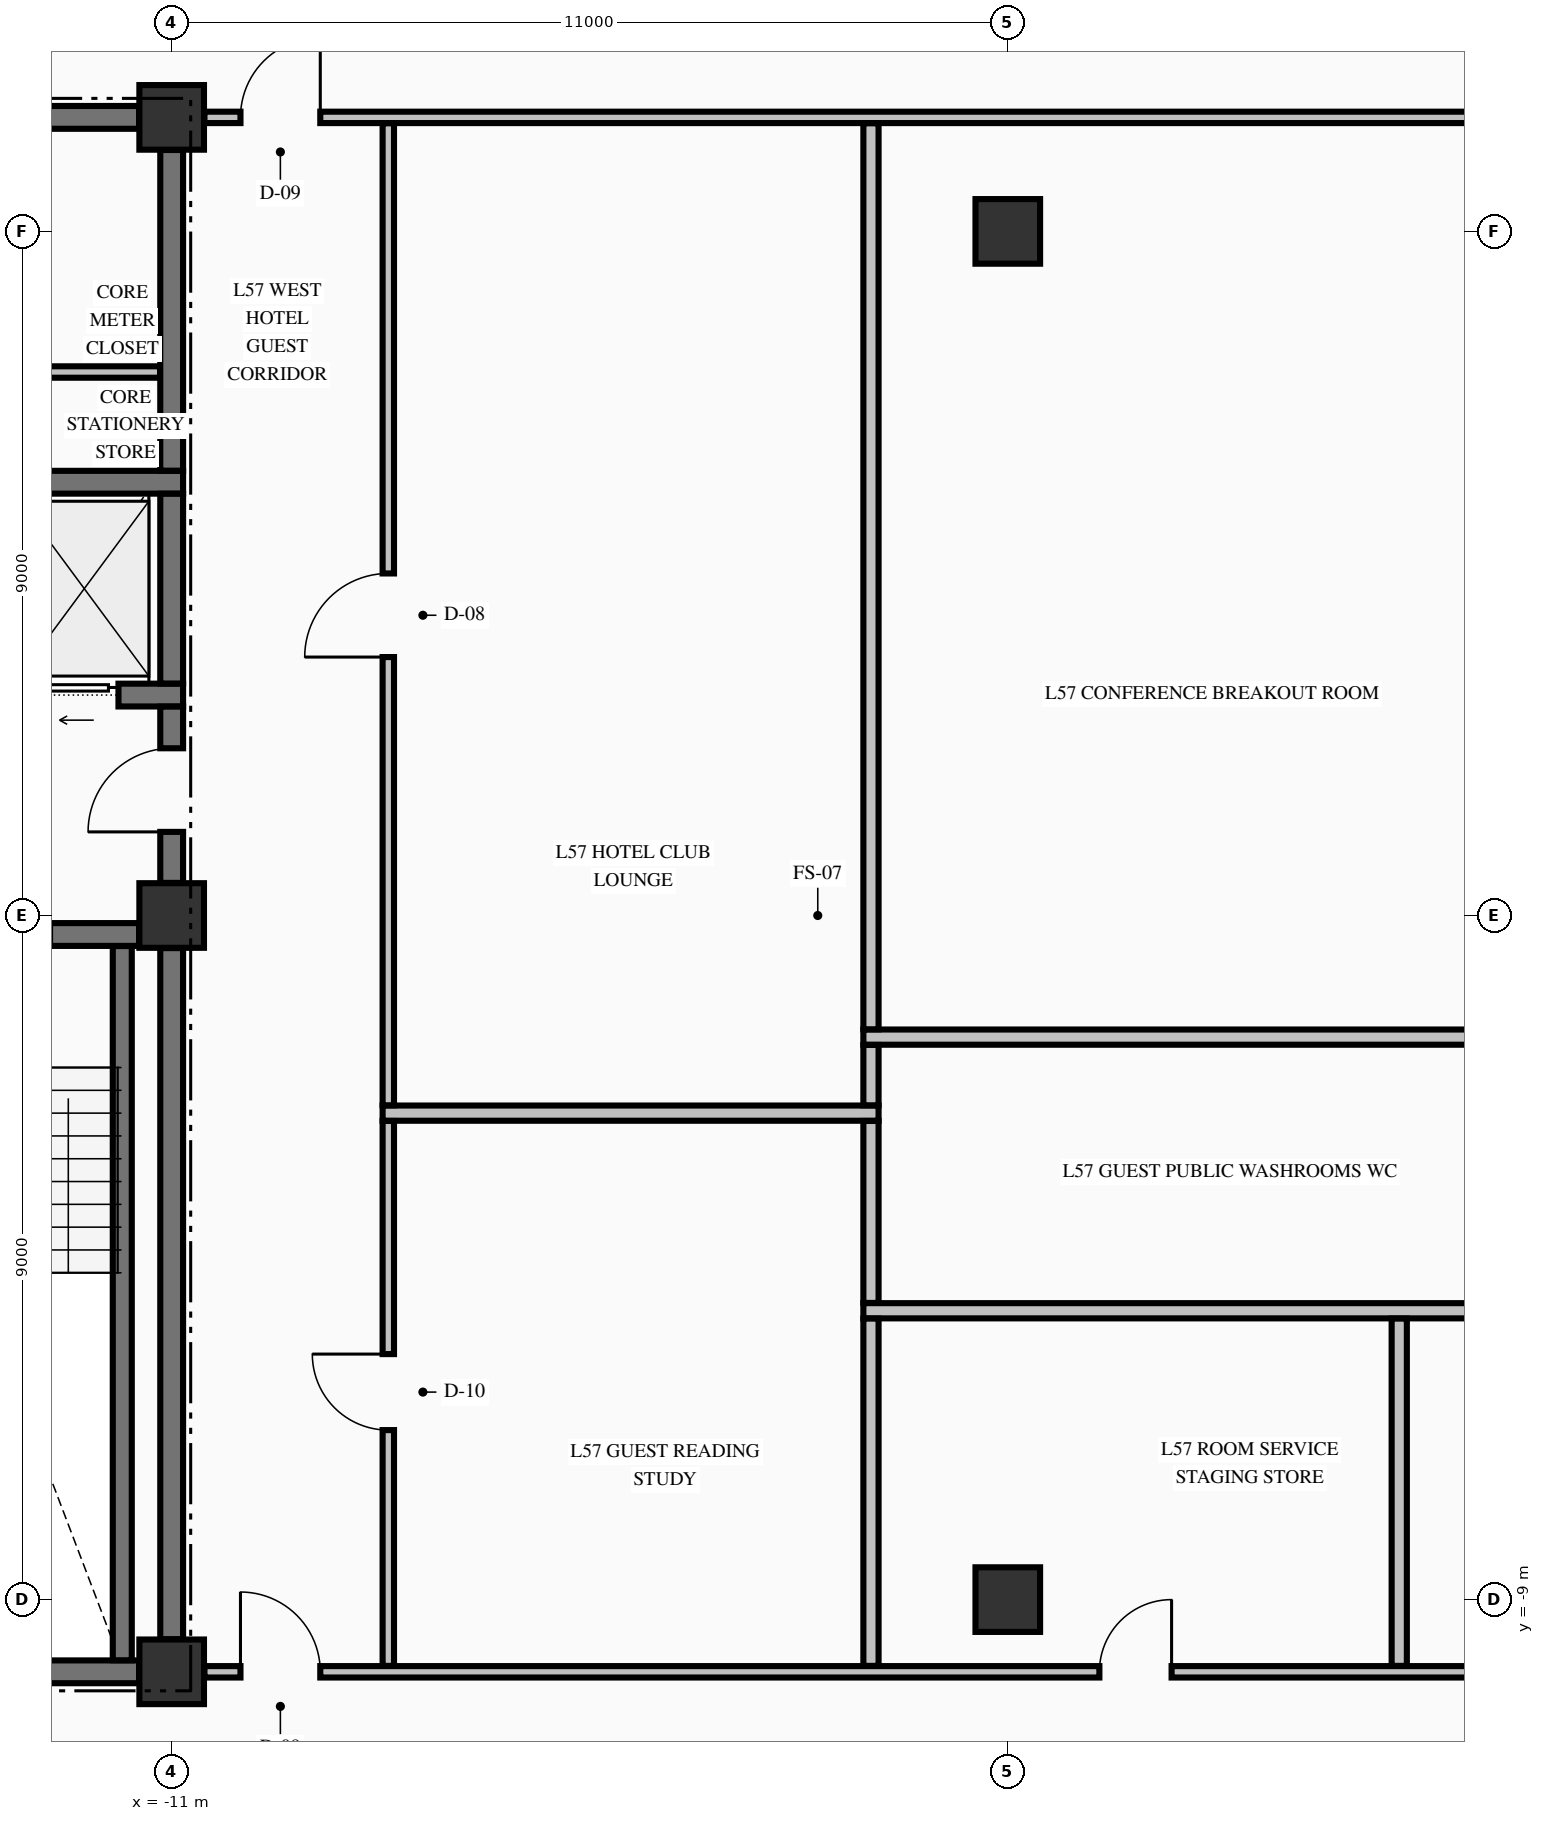
"""IFC4 building model, lengths in metres.
Left out: names, types, materials, properties, quantities, classifications, styles, units other than length and angle.
Written with IfcOpenShell. Run it as: python <this file> out.ifc"""

import sys

from ifc_helpers import new_model, si_unit, direction, frame, frame_2d, origin, origin_2d, place, context, subcontext, project, spatial, rectangle, extrude, element, fill, save


model = new_model("IFC4")
c1 = context("Model", 3, precision=1e-05, world=origin(), true_north=direction((0.0, 1.0)))
c2 = subcontext(c1, "Body", "Model", "MODEL_VIEW")
j1 = project(units=[si_unit("LENGTHUNIT", "METRE"), si_unit("PLANEANGLEUNIT", "RADIAN")], contexts=[c1])
p1 = place(None, origin())
s1 = spatial("IfcSite", under=j1, at=p1, CompositionType="ELEMENT")
p2 = place(p1, origin())
s2 = spatial("IfcBuilding", under=s1, at=p2, CompositionType="ELEMENT")
p3 = place(p2, frame((0.0, 0.0, 218.66)))
s3 = spatial("IfcBuildingStorey", under=s2, at=p3, CompositionType="ELEMENT", Elevation=218.66)
for number, where, z_axis, x_axis in (
    (1, (-11.0, -9.95, -0.25), (0.0, 0.0, 1.0), (1.0, 0.0, 0.0)),
    (2, (-11.0, 0.0, -0.25), (0.0, 0.0, 1.0), (1.0, 0.0, 0.0)),
    (3, (-11.0, 10.5, -0.25), (0.0, 0.0, 1.0), (1.0, 0.0, 0.0)),
    (4, (0.0, -9.0, -0.25), (0.0, 0.0, 1.0), (1.0, 0.0, 0.0)),
    (5, (0.0, 9.0, -0.25), (0.0, 0.0, 1.0), (1.0, 0.0, 0.0)),
):
    element("IfcColumn", number, at=place(p3, frame(where, z_axis=z_axis, x_axis=x_axis)), inside=s3, PredefinedType="COLUMN", context=c2, shape_type="SweptSolid", body=[
        extrude(rectangle(XDim=0.85, YDim=0.85, at=origin_2d()), origin(), (0.0, 0.0, 1.0), 3.225),
    ])
p4 = place(p3, frame((-14.7, -9.95, 0.0), z_axis=(0.0, 0.0, 1.0), x_axis=(1.0, 0.0, 0.0)))
e6 = element("IfcWall", 6, at=p4, inside=s3, PredefinedType="SHEAR", context=c2, shape_type="SweptSolid", body=[
    extrude(rectangle(XDim=3.271, YDim=0.3, at=frame_2d((1.635, 0.0))), origin(), (0.0, 0.0, 1.0), 2.975),
])
p5 = place(p3, frame((-19.571, -0.25, 0.0), z_axis=(0.0, 0.0, 1.0), x_axis=(1.0, 0.0, 0.0)))
e7 = element("IfcWall", 7, at=p5, inside=s3, PredefinedType="SHEAR", context=c2, shape_type="SweptSolid", body=[
    extrude(rectangle(XDim=8.142, YDim=0.3, at=frame_2d((4.071, 0.0))), origin(), (0.0, 0.0, 1.0), 2.975),
])
p6 = place(p5, frame((5.871, 0.0, 0.0)))
e8 = element("IfcOpeningElement", 8, at=p6, cuts=e7, PredefinedType="OPENING", context=c2, shape_type="SweptSolid", body=[
    extrude(rectangle(XDim=1.1, YDim=2.15, at=frame_2d((0.55, 1.075))), frame((0.0, 0.16, 0.0), z_axis=(0.0, -1.0, 0.0), x_axis=(1.0, 0.0, 0.0)), (0.0, 0.0, 1.0), 0.32),
])
p7 = place(p3, frame((-14.875, 2.9, 0.0), z_axis=(0.0, 0.0, 1.0), x_axis=(1.0, 0.0, 0.0)))
e9 = element("IfcWall", 9, at=p7, inside=s3, PredefinedType="SHEAR", context=c2, shape_type="SweptSolid", body=[
    extrude(rectangle(XDim=4.025, YDim=0.3, at=frame_2d((2.012, 0.0))), origin(), (0.0, 0.0, 1.0), 2.975),
])
p8 = place(p7, frame((2.075, 0.0, 0.0)))
e10 = element("IfcOpeningElement", 10, at=p8, cuts=e9, PredefinedType="OPENING", context=c2, shape_type="SweptSolid", body=[
    extrude(rectangle(XDim=1.1, YDim=2.2, at=frame_2d((0.55, 1.1))), frame((0.0, 0.16, 0.0), z_axis=(0.0, -1.0, 0.0), x_axis=(1.0, 0.0, 0.0)), (0.0, 0.0, 1.0), 0.32),
])
p9 = place(p3, frame((-14.875, 5.7, 0.0), z_axis=(0.0, 0.0, 1.0), x_axis=(1.0, 0.0, 0.0)))
e11 = element("IfcWall", 11, at=p9, inside=s3, PredefinedType="SHEAR", context=c2, shape_type="SweptSolid", body=[
    extrude(rectangle(XDim=4.025, YDim=0.3, at=frame_2d((2.012, 0.0))), origin(), (0.0, 0.0, 1.0), 2.975),
])
p10 = place(p3, frame((-14.7, 10.5, 0.0), z_axis=(0.0, 0.0, 1.0), x_axis=(1.0, 0.0, 0.0)))
e12 = element("IfcWall", 12, at=p10, inside=s3, PredefinedType="SHEAR", context=c2, shape_type="SweptSolid", body=[
    extrude(rectangle(XDim=3.271, YDim=0.3, at=frame_2d((1.635, 0.0))), origin(), (0.0, 0.0, 1.0), 2.975),
])
p11 = place(p10, frame((0.305, 0.0, 0.0)))
e13 = element("IfcOpeningElement", 13, at=p11, cuts=e12, PredefinedType="OPENING", context=c2, shape_type="SweptSolid", body=[
    extrude(rectangle(XDim=0.95, YDim=2.02, at=frame_2d((0.475, 1.01))), frame((0.0, 0.16, 0.0), z_axis=(0.0, -1.0, 0.0), x_axis=(1.0, 0.0, 0.0)), (0.0, 0.0, 1.0), 0.32),
])
p12 = place(p3, frame((-10.569, -9.95, 0.0), z_axis=(0.0, 0.0, 1.0), x_axis=(1.0, 0.0, 0.0)))
e14 = element("IfcWall", 14, at=p12, inside=s3, PredefinedType="PARTITIONING", context=c2, shape_type="SweptSolid", body=[
    extrude(rectangle(XDim=21.138, YDim=0.15, at=frame_2d((10.569, 0.0))), origin(), (0.0, 0.0, 1.0), 2.975),
])
p13 = place(p12, frame((0.474, 0.0, 0.0)))
e15 = element("IfcOpeningElement", 15, at=p13, cuts=e14, PredefinedType="OPENING", context=c2, shape_type="SweptSolid", body=[
    extrude(rectangle(XDim=1.05, YDim=2.15, at=frame_2d((0.525, 1.075))), frame((0.0, 0.085, 0.0), z_axis=(0.0, -1.0, 0.0), x_axis=(1.0, 0.0, 0.0)), (0.0, 0.0, 1.0), 0.17),
])
p14 = place(p12, frame((19.614, 0.0, 0.0)))
e16 = element("IfcOpeningElement", 16, at=p14, cuts=e14, PredefinedType="OPENING", context=c2, shape_type="SweptSolid", body=[
    extrude(rectangle(XDim=1.05, YDim=2.15, at=frame_2d((0.525, 1.075))), frame((0.0, 0.085, 0.0), z_axis=(0.0, -1.0, 0.0), x_axis=(1.0, 0.0, 0.0)), (0.0, 0.0, 1.0), 0.17),
])
p15 = place(p12, frame((11.774, 0.0, 0.0)))
e17 = element("IfcOpeningElement", 17, at=p15, cuts=e14, PredefinedType="OPENING", context=c2, shape_type="SweptSolid", body=[
    extrude(rectangle(XDim=0.95, YDim=2.15, at=frame_2d((0.475, 1.075))), frame((0.0, 0.085, 0.0), z_axis=(0.0, -1.0, 0.0), x_axis=(1.0, 0.0, 0.0)), (0.0, 0.0, 1.0), 0.17),
])
p16 = place(p3, frame((-1.9, -5.2, 0.0), z_axis=(0.0, 0.0, 1.0), x_axis=(1.0, 0.0, 0.0)))
e18 = element("IfcWall", 18, at=p16, inside=s3, PredefinedType="PARTITIONING", context=c2, shape_type="SweptSolid", body=[
    extrude(rectangle(XDim=10.125, YDim=0.2, at=frame_2d((5.062, 0.0))), origin(), (0.0, 0.0, 1.0), 2.975),
])
p17 = place(p3, frame((-8.225, -2.6, 0.0), z_axis=(0.0, 0.0, 1.0), x_axis=(1.0, 0.0, 0.0)))
e19 = element("IfcWall", 19, at=p17, inside=s3, PredefinedType="PARTITIONING", context=c2, shape_type="SweptSolid", body=[
    extrude(rectangle(XDim=6.525, YDim=0.2, at=frame_2d((3.263, 0.0))), origin(), (0.0, 0.0, 1.0), 2.975),
])
p18 = place(p3, frame((-1.9, -1.6, 0.0), z_axis=(0.0, 0.0, 1.0), x_axis=(1.0, 0.0, 0.0)))
e20 = element("IfcWall", 20, at=p18, inside=s3, PredefinedType="PARTITIONING", context=c2, shape_type="SweptSolid", body=[
    extrude(rectangle(XDim=10.125, YDim=0.2, at=frame_2d((5.062, 0.0))), origin(), (0.0, 0.0, 1.0), 2.975),
])
p19 = place(p3, frame((-13.225, 7.15, 0.0), z_axis=(0.0, 0.0, 1.0), x_axis=(1.0, 0.0, 0.0)))
e21 = element("IfcWall", 21, at=p19, inside=s3, PredefinedType="PARTITIONING", context=c2, shape_type="SweptSolid", body=[
    extrude(rectangle(XDim=2.072, YDim=0.15, at=frame_2d((1.036, 0.0))), origin(), (0.0, 0.0, 1.0), 2.975),
])
p20 = place(p3, frame((-10.569, 10.5, 0.0), z_axis=(0.0, 0.0, 1.0), x_axis=(1.0, 0.0, 0.0)))
e22 = element("IfcWall", 22, at=p20, inside=s3, PredefinedType="PARTITIONING", context=c2, shape_type="SweptSolid", body=[
    extrude(rectangle(XDim=21.138, YDim=0.15, at=frame_2d((10.569, 0.0))), origin(), (0.0, 0.0, 1.0), 2.975),
])
p21 = place(p20, frame((0.474, 0.0, 0.0)))
e23 = element("IfcOpeningElement", 23, at=p21, cuts=e22, PredefinedType="OPENING", context=c2, shape_type="SweptSolid", body=[
    extrude(rectangle(XDim=1.05, YDim=2.15, at=frame_2d((0.525, 1.075))), frame((0.0, 0.085, 0.0), z_axis=(0.0, -1.0, 0.0), x_axis=(1.0, 0.0, 0.0)), (0.0, 0.0, 1.0), 0.17),
])
p22 = place(p20, frame((19.614, 0.0, 0.0)))
e24 = element("IfcOpeningElement", 24, at=p22, cuts=e22, PredefinedType="OPENING", context=c2, shape_type="SweptSolid", body=[
    extrude(rectangle(XDim=1.05, YDim=2.15, at=frame_2d((0.525, 1.075))), frame((0.0, 0.085, 0.0), z_axis=(0.0, -1.0, 0.0), x_axis=(1.0, 0.0, 0.0)), (0.0, 0.0, 1.0), 0.17),
])
p23 = place(p3, frame((-11.65, -9.798, 0.0), z_axis=(0.0, 0.0, 1.0), x_axis=(0.0, 1.0, 0.0)))
e25 = element("IfcWall", 25, at=p23, inside=s3, PredefinedType="SOLIDWALL", context=c2, shape_type="SweptSolid", body=[
    extrude(rectangle(XDim=9.396, YDim=0.25, at=frame_2d((4.698, 0.0))), origin(), (0.0, 0.0, 1.0), 2.975),
])
p24 = place(p3, frame((-11.0, -9.521, 0.0), z_axis=(0.0, 0.0, 1.0), x_axis=(0.0, 1.0, 0.0)))
e26 = element("IfcWall", 26, at=p24, inside=s3, PredefinedType="SHEAR", context=c2, shape_type="SweptSolid", body=[
    extrude(rectangle(XDim=9.092, YDim=0.3, at=frame_2d((4.546, 0.0))), origin(), (0.0, 0.0, 1.0), 2.975),
])
p25 = place(p3, frame((-11.0, 0.429, 0.0), z_axis=(0.0, 0.0, 1.0), x_axis=(0.0, 1.0, 0.0)))
e27 = element("IfcWall", 27, at=p25, inside=s3, PredefinedType="SHEAR", context=c2, shape_type="SweptSolid", body=[
    extrude(rectangle(XDim=2.319, YDim=0.3, at=frame_2d((1.16, 0.0))), origin(), (0.0, 0.0, 1.0), 2.975),
])
p26 = place(p25, frame((0.671, 0.0, 0.0)))
e28 = element("IfcOpeningElement", 28, at=p26, cuts=e27, PredefinedType="OPENING", context=c2, shape_type="SweptSolid", body=[
    extrude(rectangle(XDim=1.1, YDim=2.15, at=frame_2d((0.55, 1.075))), frame((0.0, 0.16, 0.0), z_axis=(0.0, -1.0, 0.0), x_axis=(1.0, 0.0, 0.0)), (0.0, 0.0, 1.0), 0.32),
])
p27 = place(p3, frame((-11.0, 3.052, 0.0), z_axis=(0.0, 0.0, 1.0), x_axis=(0.0, 1.0, 0.0)))
e29 = element("IfcWall", 29, at=p27, inside=s3, PredefinedType="SHEAR", context=c2, shape_type="SweptSolid", body=[
    extrude(rectangle(XDim=2.496, YDim=0.3, at=frame_2d((1.248, 0.0))), origin(), (0.0, 0.0, 1.0), 2.975),
])
p28 = place(p3, frame((-11.0, 5.852, 0.0), z_axis=(0.0, 0.0, 1.0), x_axis=(0.0, 1.0, 0.0)))
e30 = element("IfcWall", 30, at=p28, inside=s3, PredefinedType="SHEAR", context=c2, shape_type="SweptSolid", body=[
    extrude(rectangle(XDim=4.219, YDim=0.3, at=frame_2d((2.109, 0.0))), origin(), (0.0, 0.0, 1.0), 2.975),
])
p29 = place(p3, frame((-8.15, -9.872, 0.0), z_axis=(0.0, 0.0, 1.0), x_axis=(0.0, 1.0, 0.0)))
e31 = element("IfcWall", 31, at=p29, inside=s3, PredefinedType="PARTITIONING", context=c2, shape_type="SweptSolid", body=[
    extrude(rectangle(XDim=7.169, YDim=0.15, at=frame_2d((3.584, 0.0))), origin(), (0.0, 0.0, 1.0), 2.975),
])
p30 = place(p29, frame((3.102, 0.0, 0.0)))
e32 = element("IfcOpeningElement", 32, at=p30, cuts=e31, PredefinedType="OPENING", context=c2, shape_type="SweptSolid", body=[
    extrude(rectangle(XDim=1.0, YDim=2.15, at=frame_2d((0.5, 1.075))), frame((0.0, 0.085, 0.0), z_axis=(0.0, -1.0, 0.0), x_axis=(1.0, 0.0, 0.0)), (0.0, 0.0, 1.0), 0.17),
])
p31 = place(p3, frame((-8.15, -2.497, 0.0), z_axis=(0.0, 0.0, 1.0), x_axis=(0.0, 1.0, 0.0)))
e33 = element("IfcWall", 33, at=p31, inside=s3, PredefinedType="PARTITIONING", context=c2, shape_type="SweptSolid", body=[
    extrude(rectangle(XDim=12.919, YDim=0.15, at=frame_2d((6.459, 0.0))), origin(), (0.0, 0.0, 1.0), 2.975),
])
p32 = place(p31, frame((5.897, 0.0, 0.0)))
e34 = element("IfcOpeningElement", 34, at=p32, cuts=e33, PredefinedType="OPENING", context=c2, shape_type="SweptSolid", body=[
    extrude(rectangle(XDim=1.1, YDim=2.15, at=frame_2d((0.55, 1.075))), frame((0.0, 0.085, 0.0), z_axis=(0.0, -1.0, 0.0), x_axis=(1.0, 0.0, 0.0)), (0.0, 0.0, 1.0), 0.17),
])
p33 = place(p3, frame((-1.8, -9.872, 0.0), z_axis=(0.0, 0.0, 1.0), x_axis=(0.0, 1.0, 0.0)))
e35 = element("IfcWall", 35, at=p33, inside=s3, PredefinedType="PARTITIONING", context=c2, shape_type="SweptSolid", body=[
    extrude(rectangle(XDim=4.569, YDim=0.2, at=frame_2d((2.285, 0.0))), origin(), (0.0, 0.0, 1.0), 2.975),
])
p34 = place(p3, frame((-1.8, -5.097, 0.0), z_axis=(0.0, 0.0, 1.0), x_axis=(0.0, 1.0, 0.0)))
e36 = element("IfcWall", 36, at=p34, inside=s3, PredefinedType="PARTITIONING", context=c2, shape_type="SweptSolid", body=[
    extrude(rectangle(XDim=2.394, YDim=0.2, at=frame_2d((1.197, 0.0))), origin(), (0.0, 0.0, 1.0), 2.975),
])
p35 = place(p3, frame((-1.8, -2.497, 0.0), z_axis=(0.0, 0.0, 1.0), x_axis=(0.0, 1.0, 0.0)))
e37 = element("IfcWall", 37, at=p35, inside=s3, PredefinedType="PARTITIONING", context=c2, shape_type="SweptSolid", body=[
    extrude(rectangle(XDim=0.794, YDim=0.2, at=frame_2d((0.397, 0.0))), origin(), (0.0, 0.0, 1.0), 2.975),
])
p36 = place(p3, frame((-1.8, -1.497, 0.0), z_axis=(0.0, 0.0, 1.0), x_axis=(0.0, 1.0, 0.0)))
e38 = element("IfcWall", 38, at=p36, inside=s3, PredefinedType="PARTITIONING", context=c2, shape_type="SweptSolid", body=[
    extrude(rectangle(XDim=11.919, YDim=0.2, at=frame_2d((5.959, 0.0))), origin(), (0.0, 0.0, 1.0), 2.975),
])
p37 = place(p3, frame((5.15, -9.872, 0.0), z_axis=(0.0, 0.0, 1.0), x_axis=(0.0, 1.0, 0.0)))
e39 = element("IfcWall", 39, at=p37, inside=s3, PredefinedType="PARTITIONING", context=c2, shape_type="SweptSolid", body=[
    extrude(rectangle(XDim=4.569, YDim=0.2, at=frame_2d((2.285, 0.0))), origin(), (0.0, 0.0, 1.0), 2.975),
])
p38 = place(p26, origin())
e40 = element("IfcDoor", 40, at=p38, inside=s3, OperationType="SINGLE_SWING_LEFT", PredefinedType="DOOR", context=c2, shape_type="SweptSolid", body=[
    extrude(rectangle(XDim=1.1, YDim=2.15, at=frame_2d((0.55, 1.075))), frame((0.0, 0.025, 0.0), z_axis=(0.0, -1.0, 0.0), x_axis=(1.0, 0.0, 0.0)), (0.0, 0.0, 1.0), 0.05),
])
fill(e28, e40)
p39 = place(p8, origin())
e41 = element("IfcDoor", 41, at=p39, inside=s3, OperationType="SLIDING_TO_LEFT", PredefinedType="DOOR", context=c2, shape_type="SweptSolid", body=[
    extrude(rectangle(XDim=1.1, YDim=2.2, at=frame_2d((0.55, 1.1))), frame((0.0, 0.025, 0.0), z_axis=(0.0, -1.0, 0.0), x_axis=(1.0, 0.0, 0.0)), (0.0, 0.0, 1.0), 0.05),
])
fill(e10, e41)
p40 = place(p21, origin())
e42 = element("IfcDoor", 42, at=p40, inside=s3, OperationType="SINGLE_SWING_RIGHT", PredefinedType="DOOR", context=c2, shape_type="SweptSolid", body=[
    extrude(rectangle(XDim=1.05, YDim=2.15, at=frame_2d((0.525, 1.075))), frame((0.0, 0.025, 0.0), z_axis=(0.0, -1.0, 0.0), x_axis=(1.0, 0.0, 0.0)), (0.0, 0.0, 1.0), 0.05),
])
fill(e23, e42)
p41 = place(p13, origin())
e43 = element("IfcDoor", 43, at=p41, inside=s3, OperationType="SINGLE_SWING_LEFT", PredefinedType="DOOR", context=c2, shape_type="SweptSolid", body=[
    extrude(rectangle(XDim=1.05, YDim=2.15, at=frame_2d((0.525, 1.075))), frame((0.0, 0.025, 0.0), z_axis=(0.0, -1.0, 0.0), x_axis=(1.0, 0.0, 0.0)), (0.0, 0.0, 1.0), 0.05),
])
fill(e15, e43)
p42 = place(p32, origin())
e44 = element("IfcDoor", 44, at=p42, inside=s3, OperationType="SINGLE_SWING_LEFT", PredefinedType="DOOR", context=c2, shape_type="SweptSolid", body=[
    extrude(rectangle(XDim=1.1, YDim=2.15, at=frame_2d((0.55, 1.075))), frame((0.0, 0.025, 0.0), z_axis=(0.0, -1.0, 0.0), x_axis=(1.0, 0.0, 0.0)), (0.0, 0.0, 1.0), 0.05),
])
fill(e34, e44)
p43 = place(p30, origin())
e45 = element("IfcDoor", 45, at=p43, inside=s3, OperationType="SINGLE_SWING_RIGHT", PredefinedType="DOOR", context=c2, shape_type="SweptSolid", body=[
    extrude(rectangle(XDim=1.0, YDim=2.15, at=frame_2d((0.5, 1.075))), frame((0.0, 0.025, 0.0), z_axis=(0.0, -1.0, 0.0), x_axis=(1.0, 0.0, 0.0)), (0.0, 0.0, 1.0), 0.05),
])
fill(e32, e45)
p44 = place(p15, origin())
e46 = element("IfcDoor", 46, at=p44, inside=s3, OperationType="SINGLE_SWING_RIGHT", PredefinedType="DOOR", context=c2, shape_type="SweptSolid", body=[
    extrude(rectangle(XDim=0.95, YDim=2.15, at=frame_2d((0.475, 1.075))), frame((0.0, 0.025, 0.0), z_axis=(0.0, -1.0, 0.0), x_axis=(1.0, 0.0, 0.0)), (0.0, 0.0, 1.0), 0.05),
])
fill(e17, e46)
save(model, sys.argv[1])
